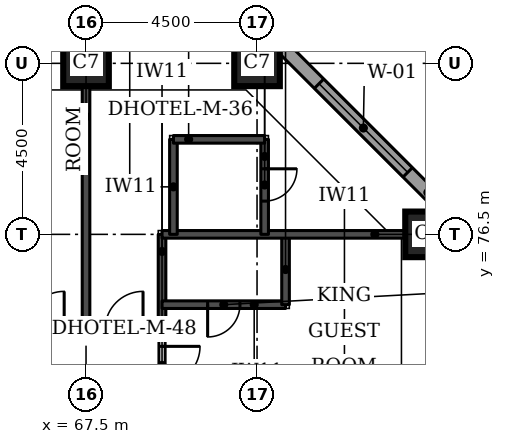
"""IFC4 building model, lengths in metres.
Left out: names, types, materials, properties, quantities, classifications, styles, units other than length and angle.
Written with IfcOpenShell. Run it as: python <this file> out.ifc"""

import sys

from ifc_helpers import new_model, si_unit, direction, frame, frame_2d, origin, origin_2d, place, context, subcontext, project, spatial, rectangle, extrude, element, fill, save


model = new_model("IFC4")
c1 = context("Model", 3, precision=1e-05, world=origin(), true_north=direction((0.0, 1.0)))
c2 = subcontext(c1, "Body", "Model", "MODEL_VIEW")
j1 = project(units=[si_unit("LENGTHUNIT", "METRE"), si_unit("PLANEANGLEUNIT", "RADIAN")], contexts=[c1])
p1 = place(None, origin())
s1 = spatial("IfcSite", under=j1, at=p1, CompositionType="ELEMENT")
p2 = place(p1, origin())
s2 = spatial("IfcBuilding", under=s1, at=p2, CompositionType="ELEMENT")
p3 = place(p2, frame((0.0, 0.0, 23.1)))
s3 = spatial("IfcBuildingStorey", under=s2, at=p3, CompositionType="ELEMENT", Elevation=23.1)
for number, where, z_axis, x_axis in (
    (1, (76.5, 76.5, 0.0), (0.0, 0.0, 1.0), (1.0, 0.0, 0.0)),
    (2, (67.5, 81.0, 0.0), (0.0, 0.0, 1.0), (1.0, 0.0, 0.0)),
    (3, (72.0, 81.0, 0.0), (0.0, 0.0, 1.0), (1.0, 0.0, 0.0)),
):
    element("IfcColumn", number, at=place(p3, frame(where, z_axis=z_axis, x_axis=x_axis)), inside=s3, PredefinedType="COLUMN", context=c2, shape_type="SweptSolid", body=[
        extrude(rectangle(XDim=1.2, YDim=1.2, at=origin_2d()), origin(), (0.0, 0.0, 1.0), 3.3),
    ])
p4 = place(p3, frame((77.326, 76.77, 0.0), z_axis=(0.0, 0.0, 1.0), x_axis=(-0.707106781187, 0.707106781187, 0.0)))
e4 = element("IfcWall", 4, at=p4, inside=s3, PredefinedType="STANDARD", context=c2, shape_type="SweptSolid", body=[
    extrude(rectangle(XDim=7.151, YDim=0.35, at=frame_2d((3.576, 0.0))), origin(), (0.0, 0.0, 1.0), 3.055),
])
p5 = place(p4, frame((1.926, 0.0, 0.8)))
e5 = element("IfcOpeningElement", 5, at=p5, cuts=e4, PredefinedType="OPENING", context=c2, shape_type="SweptSolid", body=[
    extrude(rectangle(XDim=3.3, YDim=1.5, at=frame_2d((1.65, 0.75))), frame((0.0, 0.185, 0.0), z_axis=(0.0, -1.0, 0.0), x_axis=(1.0, 0.0, 0.0)), (0.0, 0.0, 1.0), 0.37),
])
p6 = place(p3, frame((69.5, 47.5, 0.0), z_axis=(0.0, 0.0, 1.0), x_axis=(0.0, 1.0, 0.0)))
e6 = element("IfcWall", 6, at=p6, inside=s3, PredefinedType="PARTITIONING", context=c2, shape_type="SweptSolid", body=[
    extrude(rectangle(XDim=26.5, YDim=0.15, at=frame_2d((13.25, 0.0))), origin(), (0.0, 0.0, 1.0), 3.08),
])
p7 = place(p6, frame((25.053, 0.0, 0.0)))
e7 = element("IfcOpeningElement", 7, at=p7, cuts=e6, PredefinedType="OPENING", context=c2, shape_type="SweptSolid", body=[
    extrude(rectangle(XDim=1.0, YDim=2.1, at=frame_2d((0.5, 1.05))), frame((0.0, 0.085, 0.0), z_axis=(0.0, -1.0, 0.0), x_axis=(1.0, 0.0, 0.0)), (0.0, 0.0, 1.0), 0.17),
])
p8 = place(p6, frame((22.925, 0.0, 0.0)))
e8 = element("IfcOpeningElement", 8, at=p8, cuts=e6, PredefinedType="OPENING", context=c2, shape_type="SweptSolid", body=[
    extrude(rectangle(XDim=1.0, YDim=2.1, at=frame_2d((0.5, 1.05))), frame((0.0, 0.085, 0.0), z_axis=(0.0, -1.0, 0.0), x_axis=(1.0, 0.0, 0.0)), (0.0, 0.0, 1.0), 0.17),
])
p9 = place(p6, frame((16.325, 0.0, 0.0)))
e9 = element("IfcOpeningElement", 9, at=p9, cuts=e6, PredefinedType="OPENING", context=c2, shape_type="SweptSolid", body=[
    extrude(rectangle(XDim=1.0, YDim=2.1, at=frame_2d((0.5, 1.05))), frame((0.0, 0.085, 0.0), z_axis=(0.0, -1.0, 0.0), x_axis=(1.0, 0.0, 0.0)), (0.0, 0.0, 1.0), 0.17),
])
p10 = place(p6, frame((13.925, 0.0, 0.0)))
e10 = element("IfcOpeningElement", 10, at=p10, cuts=e6, PredefinedType="OPENING", context=c2, shape_type="SweptSolid", body=[
    extrude(rectangle(XDim=1.0, YDim=2.1, at=frame_2d((0.5, 1.05))), frame((0.0, 0.085, 0.0), z_axis=(0.0, -1.0, 0.0), x_axis=(1.0, 0.0, 0.0)), (0.0, 0.0, 1.0), 0.17),
])
p11 = place(p6, frame((4.25, 0.0, 0.0)))
e11 = element("IfcOpeningElement", 11, at=p11, cuts=e6, PredefinedType="OPENING", context=c2, shape_type="SweptSolid", body=[
    extrude(rectangle(XDim=1.1, YDim=2.1, at=frame_2d((0.55, 1.05))), frame((0.0, 0.085, 0.0), z_axis=(0.0, -1.0, 0.0), x_axis=(1.0, 0.0, 0.0)), (0.0, 0.0, 1.0), 0.17),
])
p12 = place(p6, frame((0.447, 0.0, 0.0)))
e12 = element("IfcOpeningElement", 12, at=p12, cuts=e6, PredefinedType="OPENING", context=c2, shape_type="SweptSolid", body=[
    extrude(rectangle(XDim=1.0, YDim=2.1, at=frame_2d((0.5, 1.05))), frame((0.0, 0.085, 0.0), z_axis=(0.0, -1.0, 0.0), x_axis=(1.0, 0.0, 0.0)), (0.0, 0.0, 1.0), 0.17),
])
p13 = place(p3, frame((43.0, 74.0, 0.0), z_axis=(0.0, 0.0, 1.0), x_axis=(1.0, 0.0, 0.0)))
e13 = element("IfcWall", 13, at=p13, inside=s3, PredefinedType="PARTITIONING", context=c2, shape_type="SweptSolid", body=[
    extrude(rectangle(XDim=26.5, YDim=0.15, at=frame_2d((13.25, 0.0))), origin(), (0.0, 0.0, 1.0), 3.08),
])
p14 = place(p13, frame((4.925, 0.0, 0.0)))
e14 = element("IfcOpeningElement", 14, at=p14, cuts=e13, PredefinedType="OPENING", context=c2, shape_type="SweptSolid", body=[
    extrude(rectangle(XDim=1.0, YDim=2.1, at=frame_2d((0.5, 1.05))), frame((0.0, 0.085, 0.0), z_axis=(0.0, -1.0, 0.0), x_axis=(1.0, 0.0, 0.0)), (0.0, 0.0, 1.0), 0.17),
])
p15 = place(p13, frame((7.325, 0.0, 0.0)))
e15 = element("IfcOpeningElement", 15, at=p15, cuts=e13, PredefinedType="OPENING", context=c2, shape_type="SweptSolid", body=[
    extrude(rectangle(XDim=1.0, YDim=2.1, at=frame_2d((0.5, 1.05))), frame((0.0, 0.085, 0.0), z_axis=(0.0, -1.0, 0.0), x_axis=(1.0, 0.0, 0.0)), (0.0, 0.0, 1.0), 0.17),
])
p16 = place(p13, frame((13.925, 0.0, 0.0)))
e16 = element("IfcOpeningElement", 16, at=p16, cuts=e13, PredefinedType="OPENING", context=c2, shape_type="SweptSolid", body=[
    extrude(rectangle(XDim=1.0, YDim=2.1, at=frame_2d((0.5, 1.05))), frame((0.0, 0.085, 0.0), z_axis=(0.0, -1.0, 0.0), x_axis=(1.0, 0.0, 0.0)), (0.0, 0.0, 1.0), 0.17),
])
p17 = place(p13, frame((16.325, 0.0, 0.0)))
e17 = element("IfcOpeningElement", 17, at=p17, cuts=e13, PredefinedType="OPENING", context=c2, shape_type="SweptSolid", body=[
    extrude(rectangle(XDim=1.0, YDim=2.1, at=frame_2d((0.5, 1.05))), frame((0.0, 0.085, 0.0), z_axis=(0.0, -1.0, 0.0), x_axis=(1.0, 0.0, 0.0)), (0.0, 0.0, 1.0), 0.17),
])
p18 = place(p13, frame((22.925, 0.0, 0.0)))
e18 = element("IfcOpeningElement", 18, at=p18, cuts=e13, PredefinedType="OPENING", context=c2, shape_type="SweptSolid", body=[
    extrude(rectangle(XDim=1.0, YDim=2.1, at=frame_2d((0.5, 1.05))), frame((0.0, 0.085, 0.0), z_axis=(0.0, -1.0, 0.0), x_axis=(1.0, 0.0, 0.0)), (0.0, 0.0, 1.0), 0.17),
])
p19 = place(p13, frame((0.5, 0.0, 0.0)))
e19 = element("IfcOpeningElement", 19, at=p19, cuts=e13, PredefinedType="OPENING", context=c2, shape_type="SweptSolid", body=[
    extrude(rectangle(XDim=1.0, YDim=2.1, at=frame_2d((0.5, 1.05))), frame((0.0, 0.085, 0.0), z_axis=(0.0, -1.0, 0.0), x_axis=(1.0, 0.0, 0.0)), (0.0, 0.0, 1.0), 0.17),
])
p20 = place(p13, frame((25.0, 0.0, 0.0)))
e20 = element("IfcOpeningElement", 20, at=p20, cuts=e13, PredefinedType="OPENING", context=c2, shape_type="SweptSolid", body=[
    extrude(rectangle(XDim=1.0, YDim=2.1, at=frame_2d((0.5, 1.05))), frame((0.0, 0.085, 0.0), z_axis=(0.0, -1.0, 0.0), x_axis=(1.0, 0.0, 0.0)), (0.0, 0.0, 1.0), 0.17),
])
p21 = place(p3, frame((67.5, 74.0, 0.0), z_axis=(0.0, 0.0, 1.0), x_axis=(0.0, 1.0, 0.0)))
e21 = element("IfcWall", 21, at=p21, inside=s3, PredefinedType="SOLIDWALL", context=c2, shape_type="SweptSolid", body=[
    extrude(rectangle(XDim=6.4, YDim=0.2, at=frame_2d((3.2, 0.0))), origin(), (0.0, 0.0, 1.0), 3.08),
])
p22 = place(p3, frame((69.5, 74.0, 0.0), z_axis=(0.0, 0.0, 1.0), x_axis=(0.0, 1.0, 0.0)))
e22 = element("IfcWall", 22, at=p22, inside=s3, PredefinedType="SOLIDWALL", context=c2, shape_type="SweptSolid", body=[
    extrude(rectangle(XDim=2.5, YDim=0.2, at=frame_2d((1.25, 0.0))), origin(), (0.0, 0.0, 1.0), 3.08),
])
p23 = place(p3, frame((69.5, 74.65, 0.0), z_axis=(0.0, 0.0, 1.0), x_axis=(1.0, 0.0, 0.0)))
e23 = element("IfcWall", 23, at=p23, inside=s3, PredefinedType="SOLIDWALL", context=c2, shape_type="SweptSolid", body=[
    extrude(rectangle(XDim=3.25, YDim=0.2, at=frame_2d((1.625, 0.0))), origin(), (0.0, 0.0, 1.0), 3.08),
])
p24 = place(p23, frame((1.2, 0.0, 0.0)))
e24 = element("IfcOpeningElement", 24, at=p24, cuts=e23, PredefinedType="OPENING", context=c2, shape_type="SweptSolid", body=[
    extrude(rectangle(XDim=0.85, YDim=2.1, at=frame_2d((0.425, 1.05))), frame((0.0, 0.11, 0.0), z_axis=(0.0, -1.0, 0.0), x_axis=(1.0, 0.0, 0.0)), (0.0, 0.0, 1.0), 0.22),
])
p25 = place(p3, frame((72.75, 74.65, 0.0), z_axis=(0.0, 0.0, 1.0), x_axis=(0.0, 1.0, 0.0)))
e25 = element("IfcWall", 25, at=p25, inside=s3, PredefinedType="SOLIDWALL", context=c2, shape_type="SweptSolid", body=[
    extrude(rectangle(XDim=1.85, YDim=0.2, at=frame_2d((0.925, 0.0))), origin(), (0.0, 0.0, 1.0), 3.08),
])
p26 = place(p3, frame((69.5, 76.5, 0.0), z_axis=(0.0, 0.0, 1.0), x_axis=(1.0, 0.0, 0.0)))
e26 = element("IfcWall", 26, at=p26, inside=s3, PredefinedType="SOLIDWALL", context=c2, shape_type="SweptSolid", body=[
    extrude(rectangle(XDim=6.4, YDim=0.2, at=frame_2d((3.2, 0.0))), origin(), (0.0, 0.0, 1.0), 3.08),
])
p27 = place(p3, frame((69.8, 76.5, 0.0), z_axis=(0.0, 0.0, 1.0), x_axis=(0.0, 1.0, 0.0)))
e27 = element("IfcWall", 27, at=p27, inside=s3, PredefinedType="SOLIDWALL", context=c2, shape_type="SweptSolid", body=[
    extrude(rectangle(XDim=2.5, YDim=0.2, at=frame_2d((1.25, 0.0))), origin(), (0.0, 0.0, 1.0), 3.08),
])
p28 = place(p3, frame((72.2, 76.5, 0.0), z_axis=(0.0, 0.0, 1.0), x_axis=(0.0, 1.0, 0.0)))
e28 = element("IfcWall", 28, at=p28, inside=s3, PredefinedType="SOLIDWALL", context=c2, shape_type="SweptSolid", body=[
    extrude(rectangle(XDim=2.5, YDim=0.2, at=frame_2d((1.25, 0.0))), origin(), (0.0, 0.0, 1.0), 3.08),
])
p29 = place(p28, frame((0.875, 0.0, 0.0)))
e29 = element("IfcOpeningElement", 29, at=p29, cuts=e28, PredefinedType="OPENING", context=c2, shape_type="SweptSolid", body=[
    extrude(rectangle(XDim=0.85, YDim=2.1, at=frame_2d((0.425, 1.05))), frame((0.0, 0.11, 0.0), z_axis=(0.0, -1.0, 0.0), x_axis=(1.0, 0.0, 0.0)), (0.0, 0.0, 1.0), 0.22),
])
p30 = place(p3, frame((69.8, 79.0, 0.0), z_axis=(0.0, 0.0, 1.0), x_axis=(1.0, 0.0, 0.0)))
e30 = element("IfcWall", 30, at=p30, inside=s3, PredefinedType="SOLIDWALL", context=c2, shape_type="SweptSolid", body=[
    extrude(rectangle(XDim=2.4, YDim=0.2, at=frame_2d((1.2, 0.0))), origin(), (0.0, 0.0, 1.0), 3.08),
])
p31 = place(p5, origin())
e31 = element("IfcWindow", 31, at=p31, inside=s3, PartitioningType="SINGLE_PANEL", PredefinedType="WINDOW", context=c2, shape_type="SweptSolid", body=[
    extrude(rectangle(XDim=3.3, YDim=1.5, at=frame_2d((1.65, 0.75))), frame((0.0, 0.085, 0.0), z_axis=(0.0, -1.0, 0.0), x_axis=(1.0, 0.0, 0.0)), (0.0, 0.0, 1.0), 0.06),
])
fill(e5, e31)
p32 = place(p18, origin())
e32 = element("IfcDoor", 32, at=p32, inside=s3, OperationType="SINGLE_SWING_RIGHT", PredefinedType="DOOR", context=c2, shape_type="SweptSolid", body=[
    extrude(rectangle(XDim=1.0, YDim=2.1, at=frame_2d((0.5, 1.05))), frame((0.0, 0.025, 0.0), z_axis=(0.0, -1.0, 0.0), x_axis=(1.0, 0.0, 0.0)), (0.0, 0.0, 1.0), 0.05),
])
fill(e18, e32)
p33 = place(p7, frame((1.0, 0.0, 0.0), z_axis=(0.0, 0.0, 1.0), x_axis=(-1.0, 0.0, 0.0)))
e33 = element("IfcDoor", 33, at=p33, inside=s3, OperationType="SINGLE_SWING_LEFT", PredefinedType="DOOR", context=c2, shape_type="SweptSolid", body=[
    extrude(rectangle(XDim=1.0, YDim=2.1, at=frame_2d((0.5, 1.05))), frame((0.0, 0.025, 0.0), z_axis=(0.0, -1.0, 0.0), x_axis=(1.0, 0.0, 0.0)), (0.0, 0.0, 1.0), 0.05),
])
fill(e7, e33)
p34 = place(p24, frame((0.85, 0.0, 0.0), z_axis=(0.0, 0.0, 1.0), x_axis=(-1.0, 0.0, 0.0)))
e34 = element("IfcDoor", 34, at=p34, inside=s3, OperationType="SINGLE_SWING_RIGHT", PredefinedType="DOOR", context=c2, shape_type="SweptSolid", body=[
    extrude(rectangle(XDim=0.85, YDim=2.1, at=frame_2d((0.425, 1.05))), frame((0.0, 0.025, 0.0), z_axis=(0.0, -1.0, 0.0), x_axis=(1.0, 0.0, 0.0)), (0.0, 0.0, 1.0), 0.05),
])
fill(e24, e34)
p35 = place(p20, origin())
e35 = element("IfcDoor", 35, at=p35, inside=s3, OperationType="SINGLE_SWING_RIGHT", PredefinedType="DOOR", context=c2, shape_type="SweptSolid", body=[
    extrude(rectangle(XDim=1.0, YDim=2.1, at=frame_2d((0.5, 1.05))), frame((0.0, 0.025, 0.0), z_axis=(0.0, -1.0, 0.0), x_axis=(1.0, 0.0, 0.0)), (0.0, 0.0, 1.0), 0.05),
])
fill(e20, e35)
p36 = place(p29, frame((0.85, 0.0, 0.0), z_axis=(0.0, 0.0, 1.0), x_axis=(-1.0, 0.0, 0.0)))
e36 = element("IfcDoor", 36, at=p36, inside=s3, OperationType="SINGLE_SWING_LEFT", PredefinedType="DOOR", context=c2, shape_type="SweptSolid", body=[
    extrude(rectangle(XDim=0.85, YDim=2.1, at=frame_2d((0.425, 1.05))), frame((0.0, 0.025, 0.0), z_axis=(0.0, -1.0, 0.0), x_axis=(1.0, 0.0, 0.0)), (0.0, 0.0, 1.0), 0.05),
])
fill(e29, e36)
save(model, sys.argv[1])
